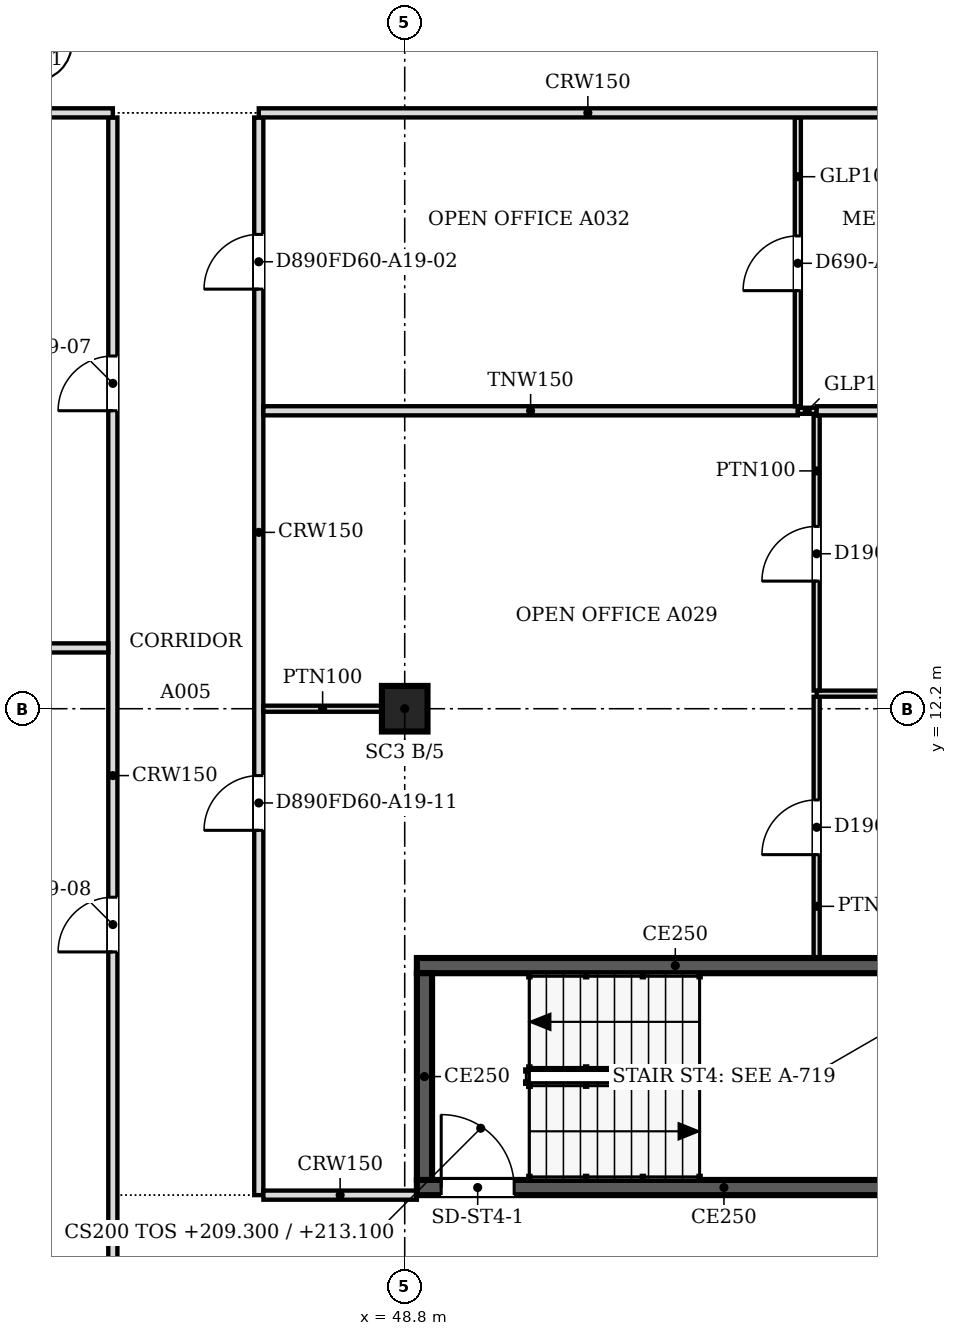
"""IFC4 building model, lengths in metres.
Left out: names, types, materials, properties, quantities, classifications, styles, units other than length and angle.
Written with IfcOpenShell. Run it as: python <this file> out.ifc"""

import sys

from ifc_helpers import new_model, si_unit, direction, frame, frame_2d, origin, origin_2d, place, context, subcontext, project, spatial, rectangle, extrude, source, transform, mapped, element, fill, save


model = new_model("IFC4")
c1 = context("Model", 3, precision=1e-05, world=origin(), true_north=direction((0.0, 1.0)))
c2 = subcontext(c1, "Body", "Model", "MODEL_VIEW")
j1 = project(units=[si_unit("LENGTHUNIT", "METRE"), si_unit("PLANEANGLEUNIT", "RADIAN")], contexts=[c1])
p1 = place(None, origin())
s1 = spatial("IfcSite", under=j1, at=p1, CompositionType="ELEMENT")
p2 = place(p1, origin())
s2 = spatial("IfcBuilding", under=s1, at=p2, CompositionType="ELEMENT")
p3 = place(p2, frame((0.0, 0.0, 209.3)))
s3 = spatial("IfcBuildingStorey", under=s2, at=p3, CompositionType="ELEMENT", Elevation=209.3)
p4 = place(p3, frame((48.8, 12.2, 0.0), z_axis=(0.0, 0.0, 1.0), x_axis=(1.0, 0.0, 0.0)))
e1 = element("IfcColumn", 1, at=p4, inside=s3, PredefinedType="COLUMN", context=c2, shape_type="SweptSolid", body=[
    extrude(rectangle(XDim=0.75, YDim=0.75, at=origin_2d()), origin(), (0.0, 0.0, 1.0), 3.6),
])
p5 = place(p3, frame((57.5, 4.325, 0.0), z_axis=(0.0, 0.0, 1.0), x_axis=(-1.0, 0.0, 0.0)))
e2 = element("IfcWall", 2, at=p5, inside=s3, PredefinedType="SOLIDWALL", context=c2, shape_type="SweptSolid", body=[
    extrude(rectangle(XDim=8.5, YDim=0.25, at=frame_2d((4.25, 0.0))), origin(), (0.0, 0.0, 1.0), 3.8),
])
m1 = source(origin(), c2, "Body", "SweptSolid", [
    extrude(rectangle(XDim=1.2, YDim=2.1, at=frame_2d((0.6, 1.05))), frame((0.0, 0.135, 0.0), z_axis=(0.0, -1.0, 0.0), x_axis=(1.0, 0.0, 0.0)), (0.0, 0.0, 1.0), 0.27),
])
p6 = place(p5, frame((6.9, 0.0, 0.0)))
e3 = element("IfcOpeningElement", 3, at=p6, cuts=e2, PredefinedType="OPENING", context=c2, shape_type="MappedRepresentation", body=[
    mapped(m1, transform((0.0, 0.0, 0.0), scale=1.0)),
])
p7 = place(p3, frame((49.125, 4.45, 0.0), z_axis=(0.0, 0.0, 1.0), x_axis=(0.0, 1.0, 0.0)))
e4 = element("IfcWall", 4, at=p7, inside=s3, PredefinedType="SOLIDWALL", context=c2, shape_type="SweptSolid", body=[
    extrude(rectangle(XDim=3.4, YDim=0.25, at=frame_2d((1.7, 0.0))), origin(), (0.0, 0.0, 1.0), 3.8),
])
p8 = place(p3, frame((49.0, 7.975, 0.0), z_axis=(0.0, 0.0, 1.0), x_axis=(1.0, 0.0, 0.0)))
e5 = element("IfcWall", 5, at=p8, inside=s3, PredefinedType="SOLIDWALL", context=c2, shape_type="SweptSolid", body=[
    extrude(rectangle(XDim=8.5, YDim=0.25, at=frame_2d((4.25, 0.0))), origin(), (0.0, 0.0, 1.0), 3.8),
])
p9 = place(p3, frame((44.0, 0.5, 0.0), z_axis=(0.0, 0.0, 1.0), x_axis=(0.0, 1.0, 0.0)))
e6 = element("IfcWall", 6, at=p9, inside=s3, PredefinedType="PARTITIONING", context=c2, shape_type="SweptSolid", body=[
    extrude(rectangle(XDim=21.424, YDim=0.15, at=frame_2d((10.712, 0.0))), origin(), (0.0, 0.0, 1.0), 3.067),
])
m2 = source(origin(), c2, "Body", "SweptSolid", [
    extrude(rectangle(XDim=0.9, YDim=2.1, at=frame_2d((0.45, 1.05))), frame((0.0, 0.085, 0.0), z_axis=(0.0, -1.0, 0.0), x_axis=(1.0, 0.0, 0.0)), (0.0, 0.0, 1.0), 0.17),
])
p10 = place(p9, frame((16.601, 0.0, 0.0)))
e7 = element("IfcOpeningElement", 7, at=p10, cuts=e6, PredefinedType="OPENING", context=c2, shape_type="MappedRepresentation", body=[
    mapped(m2, transform((0.0, 0.0, 0.0), scale=1.0)),
])
p11 = place(p9, frame((7.7, 0.0, 0.0)))
e8 = element("IfcOpeningElement", 8, at=p11, cuts=e6, PredefinedType="OPENING", context=c2, shape_type="MappedRepresentation", body=[
    mapped(m2, transform((0.0, 0.0, 0.0), scale=1.0)),
])
p12 = place(p3, frame((46.4, 21.924, 0.0), z_axis=(0.0, 0.0, 1.0), x_axis=(0.0, -1.0, 0.0)))
e9 = element("IfcWall", 9, at=p12, inside=s3, PredefinedType="PARTITIONING", context=c2, shape_type="SweptSolid", body=[
    extrude(rectangle(XDim=17.724, YDim=0.15, at=frame_2d((8.862, 0.0))), origin(), (0.0, 0.0, 1.0), 3.067),
])
p13 = place(p12, frame((1.923, 0.0, 0.0)))
e10 = element("IfcOpeningElement", 10, at=p13, cuts=e9, PredefinedType="OPENING", context=c2, shape_type="MappedRepresentation", body=[
    mapped(m2, transform((0.0, 0.0, 0.0), scale=1.0)),
])
p14 = place(p12, frame((10.824, 0.0, 0.0)))
e11 = element("IfcOpeningElement", 11, at=p14, cuts=e9, PredefinedType="OPENING", context=c2, shape_type="MappedRepresentation", body=[
    mapped(m2, transform((0.0, 0.0, 0.0), scale=1.0)),
])
p15 = place(p3, frame((46.476, 4.2, 0.0), z_axis=(0.0, 0.0, 1.0), x_axis=(1.0, 0.0, 0.0)))
e12 = element("IfcWall", 12, at=p15, inside=s3, PredefinedType="PARTITIONING", context=c2, shape_type="SweptSolid", body=[
    extrude(rectangle(XDim=2.524, YDim=0.15, at=frame_2d((1.262, 0.0))), origin(), (0.0, 0.0, 1.0), 3.067),
])
p16 = place(p3, frame((55.575, 12.397, 0.0), z_axis=(0.0, 0.0, 1.0), x_axis=(0.0, -1.0, 0.0)))
e13 = element("IfcWall", 13, at=p16, inside=s3, PredefinedType="PARTITIONING", context=c2, shape_type="SweptSolid", body=[
    extrude(rectangle(XDim=4.297, YDim=0.1, at=frame_2d((2.148, 0.0))), origin(), (0.0, 0.0, 1.0), 3.067),
])
m3 = source(origin(), c2, "Body", "SweptSolid", [
    extrude(rectangle(XDim=0.9, YDim=2.1, at=frame_2d((0.45, 1.05))), frame((0.0, 0.06, 0.0), z_axis=(0.0, -1.0, 0.0), x_axis=(1.0, 0.0, 0.0)), (0.0, 0.0, 1.0), 0.12),
])
p17 = place(p16, frame((1.697, 0.0, 0.0)))
e14 = element("IfcOpeningElement", 14, at=p17, cuts=e13, PredefinedType="OPENING", context=c2, shape_type="MappedRepresentation", body=[
    mapped(m3, transform((0.0, 0.0, 0.0), scale=1.0)),
])
p18 = place(p3, frame((48.425, 12.2, 0.0), z_axis=(0.0, 0.0, 1.0), x_axis=(-1.0, 0.0, 0.0)))
e15 = element("IfcWall", 15, at=p18, inside=s3, PredefinedType="PARTITIONING", context=c2, shape_type="SweptSolid", body=[
    extrude(rectangle(XDim=1.95, YDim=0.1, at=frame_2d((0.975, 0.0))), origin(), (0.0, 0.0, 1.0), 3.067),
])
p19 = place(p3, frame((55.575, 12.448, 0.0), z_axis=(0.0, 0.0, 1.0), x_axis=(1.0, 0.0, 0.0)))
e16 = element("IfcWall", 16, at=p19, inside=s3, PredefinedType="PARTITIONING", context=c2, shape_type="SweptSolid", body=[
    extrude(rectangle(XDim=4.925, YDim=0.1, at=frame_2d((2.462, 0.0))), origin(), (0.0, 0.0, 1.0), 3.067),
])
p20 = place(p3, frame((55.575, 17.024, 0.0), z_axis=(0.0, 0.0, 1.0), x_axis=(0.0, -1.0, 0.0)))
e17 = element("IfcWall", 17, at=p20, inside=s3, PredefinedType="PARTITIONING", context=c2, shape_type="SweptSolid", body=[
    extrude(rectangle(XDim=4.525, YDim=0.1, at=frame_2d((2.263, 0.0))), origin(), (0.0, 0.0, 1.0), 3.067),
])
p21 = place(p20, frame((1.825, 0.0, 0.0)))
e18 = element("IfcOpeningElement", 18, at=p21, cuts=e17, PredefinedType="OPENING", context=c2, shape_type="MappedRepresentation", body=[
    mapped(m3, transform((0.0, 0.0, 0.0), scale=1.0)),
])
p22 = place(p3, frame((27.575, 13.2, 0.0), z_axis=(0.0, 0.0, 1.0), x_axis=(1.0, 0.0, 0.0)))
e19 = element("IfcWall", 19, at=p22, inside=s3, PredefinedType="PARTITIONING", context=c2, shape_type="SweptSolid", body=[
    extrude(rectangle(XDim=16.349, YDim=0.15, at=frame_2d((8.175, 0.0))), origin(), (0.0, 0.0, 1.0), 3.067),
])
p23 = place(p3, frame((46.476, 17.1, 0.0), z_axis=(0.0, 0.0, 1.0), x_axis=(1.0, 0.0, 0.0)))
e20 = element("IfcWall", 20, at=p23, inside=s3, PredefinedType="PARTITIONING", context=c2, shape_type="SweptSolid", body=[
    extrude(rectangle(XDim=8.789, YDim=0.15, at=frame_2d((4.395, 0.0))), origin(), (0.0, 0.0, 1.0), 3.067),
])
p24 = place(p3, frame((55.266, 17.1, 0.0), z_axis=(0.0, 0.0, 1.0), x_axis=(1.0, 0.0, 0.0)))
e21 = element("IfcWall", 21, at=p24, inside=s3, PredefinedType="PARTITIONING", context=c2, shape_type="SweptSolid", body=[
    extrude(rectangle(XDim=0.308, YDim=0.1, at=frame_2d((0.154, 0.0))), origin(), (0.0, 0.0, 1.0), 3.067),
])
p25 = place(p3, frame((55.575, 17.1, 0.0), z_axis=(0.0, 0.0, 1.0), x_axis=(1.0, 0.0, 0.0)))
e22 = element("IfcWall", 22, at=p25, inside=s3, PredefinedType="PARTITIONING", context=c2, shape_type="SweptSolid", body=[
    extrude(rectangle(XDim=4.925, YDim=0.15, at=frame_2d((2.462, 0.0))), origin(), (0.0, 0.0, 1.0), 3.067),
])
p26 = place(p3, frame((55.265, 21.924, 0.0), z_axis=(0.0, 0.0, 1.0), x_axis=(0.0, -1.0, 0.0)))
e23 = element("IfcWall", 23, at=p26, inside=s3, PredefinedType="PARTITIONING", context=c2, shape_type="SweptSolid", body=[
    extrude(rectangle(XDim=4.748, YDim=0.1, at=frame_2d((2.374, 0.0))), origin(), (0.0, 0.0, 1.0), 3.067),
])
p27 = place(p26, frame((1.948, 0.0, 0.0)))
e24 = element("IfcOpeningElement", 24, at=p27, cuts=e23, PredefinedType="OPENING", context=c2, shape_type="MappedRepresentation", body=[
    mapped(m3, transform((0.0, 0.0, 0.0), scale=1.0)),
])
p28 = place(p3, frame((30.5, 22.0, 0.0), z_axis=(0.0, 0.0, 1.0), x_axis=(1.0, 0.0, 0.0)))
e25 = element("IfcWall", 25, at=p28, inside=s3, PredefinedType="PARTITIONING", context=c2, shape_type="SweptSolid", body=[
    extrude(rectangle(XDim=13.5, YDim=0.15, at=frame_2d((6.75, 0.0))), origin(), (0.0, 0.0, 1.0), 3.067),
])
p29 = place(p3, frame((46.4, 22.0, 0.0), z_axis=(0.0, 0.0, 1.0), x_axis=(1.0, 0.0, 0.0)))
e26 = element("IfcWall", 26, at=p29, inside=s3, PredefinedType="PARTITIONING", context=c2, shape_type="SweptSolid", body=[
    extrude(rectangle(XDim=10.824, YDim=0.15, at=frame_2d((5.412, 0.0))), origin(), (0.0, 0.0, 1.0), 3.067),
])
m4 = source(origin(), c2, "Body", "SweptSolid", [
    extrude(rectangle(XDim=1.2, YDim=2.1, at=frame_2d((0.6, 1.05))), frame((0.0, 0.025, 0.0), z_axis=(0.0, -1.0, 0.0), x_axis=(1.0, 0.0, 0.0)), (0.0, 0.0, 1.0), 0.05),
])
p30 = place(p6, origin())
e27 = element("IfcDoor", 27, at=p30, inside=s3, OperationType="SINGLE_SWING_RIGHT", PredefinedType="DOOR", context=c2, shape_type="MappedRepresentation", body=[
    mapped(m4, transform((0.0, 0.0, 0.0), scale=1.0)),
])
fill(e3, e27)
m5 = source(origin(), c2, "Body", "SweptSolid", [
    extrude(rectangle(XDim=0.9, YDim=2.1, at=frame_2d((0.45, 1.05))), frame((0.0, 0.025, 0.0), z_axis=(0.0, -1.0, 0.0), x_axis=(1.0, 0.0, 0.0)), (0.0, 0.0, 1.0), 0.05),
])
p31 = place(p17, origin())
e28 = element("IfcDoor", 28, at=p31, inside=s3, OperationType="SINGLE_SWING_RIGHT", PredefinedType="DOOR", context=c2, shape_type="MappedRepresentation", body=[
    mapped(m5, transform((0.0, 0.0, 0.0), scale=1.0)),
])
fill(e14, e28)
p32 = place(p21, origin())
e29 = element("IfcDoor", 29, at=p32, inside=s3, OperationType="SINGLE_SWING_RIGHT", PredefinedType="DOOR", context=c2, shape_type="MappedRepresentation", body=[
    mapped(m5, transform((0.0, 0.0, 0.0), scale=1.0)),
])
fill(e18, e29)
p33 = place(p27, origin())
e30 = element("IfcDoor", 30, at=p33, inside=s3, OperationType="SINGLE_SWING_RIGHT", PredefinedType="DOOR", context=c2, shape_type="MappedRepresentation", body=[
    mapped(m5, transform((0.0, 0.0, 0.0), scale=1.0)),
])
fill(e24, e30)
p34 = place(p13, origin())
e31 = element("IfcDoor", 31, at=p34, inside=s3, OperationType="SINGLE_SWING_RIGHT", PredefinedType="DOOR", context=c2, shape_type="MappedRepresentation", body=[
    mapped(m5, transform((0.0, 0.0, 0.0), scale=1.0)),
])
fill(e10, e31)
p35 = place(p10, origin())
e32 = element("IfcDoor", 32, at=p35, inside=s3, OperationType="SINGLE_SWING_LEFT", PredefinedType="DOOR", context=c2, shape_type="MappedRepresentation", body=[
    mapped(m5, transform((0.0, 0.0, 0.0), scale=1.0)),
])
fill(e7, e32)
p36 = place(p11, origin())
e33 = element("IfcDoor", 33, at=p36, inside=s3, OperationType="SINGLE_SWING_LEFT", PredefinedType="DOOR", context=c2, shape_type="MappedRepresentation", body=[
    mapped(m5, transform((0.0, 0.0, 0.0), scale=1.0)),
])
fill(e8, e33)
p37 = place(p14, origin())
e34 = element("IfcDoor", 34, at=p37, inside=s3, OperationType="SINGLE_SWING_RIGHT", PredefinedType="DOOR", context=c2, shape_type="MappedRepresentation", body=[
    mapped(m5, transform((0.0, 0.0, 0.0), scale=1.0)),
])
fill(e11, e34)
save(model, sys.argv[1])
